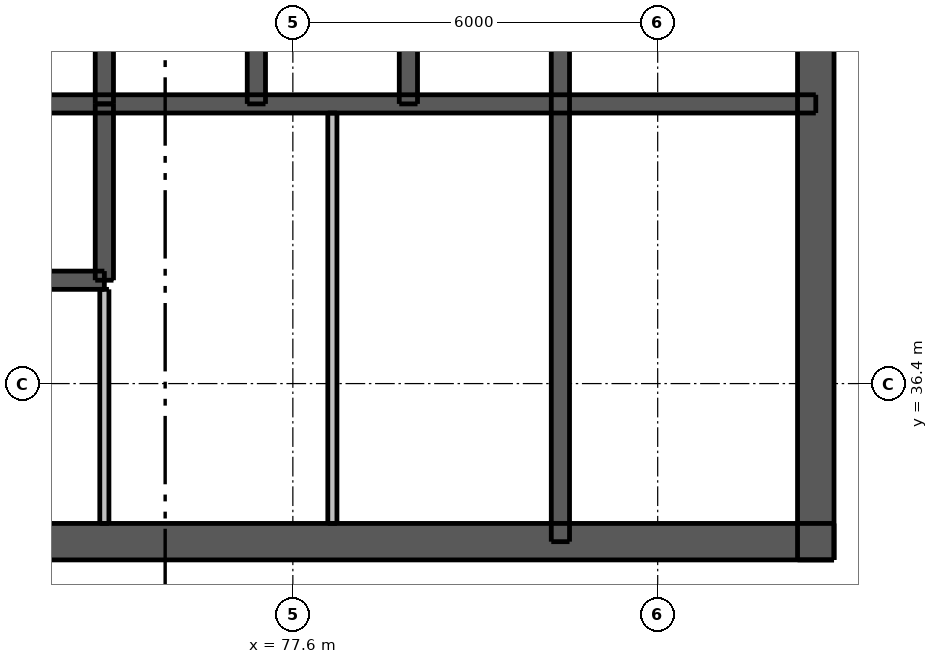
"""IFC4 building model, lengths in metres.
Left out: names, types, materials, properties, quantities, classifications, styles, units other than length and angle.
Written with IfcOpenShell. Run it as: python <this file> out.ifc"""

import sys

from ifc_helpers import new_model, si_unit, direction, frame, frame_2d, origin, place, context, subcontext, project, spatial, rectangle, extrude, element, fill, save


model = new_model("IFC4")
c1 = context("Model", 3, precision=1e-05, world=origin(), true_north=direction((0.0, 1.0)))
c2 = subcontext(c1, "Body", "Model", "MODEL_VIEW")
j1 = project(units=[si_unit("LENGTHUNIT", "METRE"), si_unit("PLANEANGLEUNIT", "RADIAN")], contexts=[c1])
p1 = place(None, origin())
s1 = spatial("IfcSite", under=j1, at=p1, CompositionType="ELEMENT")
p2 = place(p1, origin())
s2 = spatial("IfcBuilding", under=s1, at=p2, CompositionType="ELEMENT")
p3 = place(p2, frame((0.0, 0.0, 193.6)))
s3 = spatial("IfcBuildingStorey", under=s2, at=p3, CompositionType="ELEMENT", Elevation=193.6)
p4 = place(p3, frame((62.5, 33.8, 0.0), z_axis=(0.0, 0.0, 1.0), x_axis=(1.0, 0.0, 0.0)))
e1 = element("IfcWall", 1, at=p4, inside=s3, PredefinedType="SHEAR", context=c2, shape_type="SweptSolid", body=[
    extrude(rectangle(XDim=24.0, YDim=0.6, at=frame_2d((12.0, 0.0))), origin(), (0.0, 0.0, 1.0), 3.05),
])
p5 = place(p4, frame((1.925, 0.0, 0.0)))
e2 = element("IfcOpeningElement", 2, at=p5, cuts=e1, PredefinedType="OPENING", context=c2, shape_type="SweptSolid", body=[
    extrude(rectangle(XDim=1.1, YDim=2.1, at=frame_2d((0.55, 1.05))), frame((0.0, 0.31, 0.0), z_axis=(0.0, -1.0, 0.0), x_axis=(1.0, 0.0, 0.0)), (0.0, 0.0, 1.0), 0.62),
])
p6 = place(p4, frame((20.975, 0.0, 0.0)))
e3 = element("IfcOpeningElement", 3, at=p6, cuts=e1, PredefinedType="OPENING", context=c2, shape_type="SweptSolid", body=[
    extrude(rectangle(XDim=1.1, YDim=2.1, at=frame_2d((0.55, 1.05))), frame((0.0, 0.31, 0.0), z_axis=(0.0, -1.0, 0.0), x_axis=(1.0, 0.0, 0.0)), (0.0, 0.0, 1.0), 0.62),
])
p7 = place(p4, frame((8.0, 0.0, 0.0)))
e4 = element("IfcOpeningElement", 4, at=p7, cuts=e1, PredefinedType="OPENING", context=c2, shape_type="SweptSolid", body=[
    extrude(rectangle(XDim=1.1, YDim=2.1, at=frame_2d((0.55, 1.05))), frame((0.0, 0.31, 0.0), z_axis=(0.0, -1.0, 0.0), x_axis=(1.0, 0.0, 0.0)), (0.0, 0.0, 1.0), 0.62),
])
p8 = place(p4, frame((13.5, 0.0, 0.0)))
e5 = element("IfcOpeningElement", 5, at=p8, cuts=e1, PredefinedType="OPENING", context=c2, shape_type="SweptSolid", body=[
    extrude(rectangle(XDim=0.9, YDim=2.1, at=frame_2d((0.45, 1.05))), frame((0.0, 0.31, 0.0), z_axis=(0.0, -1.0, 0.0), x_axis=(1.0, 0.0, 0.0)), (0.0, 0.0, 1.0), 0.62),
])
p9 = place(p4, frame((17.1, 0.0, 0.0)))
e6 = element("IfcOpeningElement", 6, at=p9, cuts=e1, PredefinedType="OPENING", context=c2, shape_type="SweptSolid", body=[
    extrude(rectangle(XDim=0.9, YDim=2.1, at=frame_2d((0.45, 1.05))), frame((0.0, 0.31, 0.0), z_axis=(0.0, -1.0, 0.0), x_axis=(1.0, 0.0, 0.0)), (0.0, 0.0, 1.0), 0.62),
])
p10 = place(p3, frame((86.2, 33.5, 0.0), z_axis=(0.0, 0.0, 1.0), x_axis=(0.0, 1.0, 0.0)))
e7 = element("IfcWall", 7, at=p10, inside=s3, PredefinedType="SHEAR", context=c2, shape_type="SweptSolid", body=[
    extrude(rectangle(XDim=24.0, YDim=0.6, at=frame_2d((12.0, 0.0))), origin(), (0.0, 0.0, 1.0), 3.05),
])
p11 = place(p10, frame((11.2, 0.0, 0.0)))
e8 = element("IfcOpeningElement", 8, at=p11, cuts=e7, PredefinedType="OPENING", context=c2, shape_type="SweptSolid", body=[
    extrude(rectangle(XDim=1.6, YDim=2.1, at=frame_2d((0.8, 1.05))), frame((0.0, 0.31, 0.0), z_axis=(0.0, -1.0, 0.0), x_axis=(1.0, 0.0, 0.0)), (0.0, 0.0, 1.0), 0.62),
])
p12 = place(p3, frame((62.8, 41.0, 0.0), z_axis=(0.0, 0.0, 1.0), x_axis=(1.0, 0.0, 0.0)))
e9 = element("IfcWall", 9, at=p12, inside=s3, PredefinedType="SHEAR", context=c2, shape_type="SweptSolid", body=[
    extrude(rectangle(XDim=23.4, YDim=0.3, at=frame_2d((11.7, 0.0))), origin(), (0.0, 0.0, 1.0), 3.05),
])
p13 = place(p3, frame((82.0, 33.8, 0.0), z_axis=(0.0, 0.0, 1.0), x_axis=(0.0, 1.0, 0.0)))
e10 = element("IfcWall", 10, at=p13, inside=s3, PredefinedType="SHEAR", context=c2, shape_type="SweptSolid", body=[
    extrude(rectangle(XDim=10.1, YDim=0.3, at=frame_2d((5.05, 0.0))), origin(), (0.0, 0.0, 1.0), 3.05),
])
for number, where, z_axis, x_axis in (
    (11, (74.5, 41.0, 0.0), (0.0, 0.0, 1.0), (0.0, 1.0, 0.0)),
    (12, (77.0, 41.0, 0.0), (0.0, 0.0, 1.0), (0.0, 1.0, 0.0)),
    (13, (79.5, 41.0, 0.0), (0.0, 0.0, 1.0), (0.0, 1.0, 0.0)),
):
    element("IfcWall", number, at=place(p3, frame(where, z_axis=z_axis, x_axis=x_axis)), inside=s3, PredefinedType="SHEAR", context=c2, shape_type="SweptSolid", body=[
        extrude(rectangle(XDim=2.9, YDim=0.3, at=frame_2d((1.45, 0.0))), origin(), (0.0, 0.0, 1.0), 3.05),
    ])
p14 = place(p3, frame((67.0, 38.1, 0.0), z_axis=(0.0, 0.0, 1.0), x_axis=(1.0, 0.0, 0.0)))
e14 = element("IfcWall", 14, at=p14, inside=s3, PredefinedType="SHEAR", context=c2, shape_type="SweptSolid", body=[
    extrude(rectangle(XDim=7.5, YDim=0.3, at=frame_2d((3.75, 0.0))), origin(), (0.0, 0.0, 1.0), 3.05),
])
p15 = place(p14, frame((0.7, 0.0, 0.0)))
e15 = element("IfcOpeningElement", 15, at=p15, cuts=e14, PredefinedType="OPENING", context=c2, shape_type="SweptSolid", body=[
    extrude(rectangle(XDim=1.1, YDim=2.1, at=frame_2d((0.55, 1.05))), frame((0.0, 0.16, 0.0), z_axis=(0.0, -1.0, 0.0), x_axis=(1.0, 0.0, 0.0)), (0.0, 0.0, 1.0), 0.32),
])
p16 = place(p14, frame((3.2, 0.0, 0.0)))
e16 = element("IfcOpeningElement", 16, at=p16, cuts=e14, PredefinedType="OPENING", context=c2, shape_type="SweptSolid", body=[
    extrude(rectangle(XDim=1.1, YDim=2.1, at=frame_2d((0.55, 1.05))), frame((0.0, 0.16, 0.0), z_axis=(0.0, -1.0, 0.0), x_axis=(1.0, 0.0, 0.0)), (0.0, 0.0, 1.0), 0.32),
])
p17 = place(p14, frame((5.65, 0.0, 0.0)))
e17 = element("IfcOpeningElement", 17, at=p17, cuts=e14, PredefinedType="OPENING", context=c2, shape_type="SweptSolid", body=[
    extrude(rectangle(XDim=1.2, YDim=2.1, at=frame_2d((0.6, 1.05))), frame((0.0, 0.16, 0.0), z_axis=(0.0, -1.0, 0.0), x_axis=(1.0, 0.0, 0.0)), (0.0, 0.0, 1.0), 0.32),
])
p18 = place(p3, frame((74.5, 38.1, 0.0), z_axis=(0.0, 0.0, 1.0), x_axis=(0.0, 1.0, 0.0)))
e18 = element("IfcWall", 18, at=p18, inside=s3, PredefinedType="SHEAR", context=c2, shape_type="SweptSolid", body=[
    extrude(rectangle(XDim=2.9, YDim=0.3, at=frame_2d((1.45, 0.0))), origin(), (0.0, 0.0, 1.0), 3.05),
])
p19 = place(p3, frame((74.5, 34.1, 0.0), z_axis=(0.0, 0.0, 1.0), x_axis=(0.0, 1.0, 0.0)))
e19 = element("IfcWall", 19, at=p19, inside=s3, PredefinedType="PLUMBINGWALL", context=c2, shape_type="SweptSolid", body=[
    extrude(rectangle(XDim=3.85, YDim=0.15, at=frame_2d((1.925, 0.0))), origin(), (0.0, 0.0, 1.0), 3.05),
])
p20 = place(p3, frame((78.25, 34.1, 0.0), z_axis=(0.0, 0.0, 1.0), x_axis=(0.0, 1.0, 0.0)))
e20 = element("IfcWall", 20, at=p20, inside=s3, PredefinedType="PLUMBINGWALL", context=c2, shape_type="SweptSolid", body=[
    extrude(rectangle(XDim=6.75, YDim=0.15, at=frame_2d((3.375, 0.0))), origin(), (0.0, 0.0, 1.0), 3.05),
])
p21 = place(p6, origin())
e21 = element("IfcDoor", 21, at=p21, inside=s3, OperationType="SINGLE_SWING_RIGHT", PredefinedType="DOOR", context=c2, shape_type="SweptSolid", body=[
    extrude(rectangle(XDim=1.1, YDim=2.1, at=frame_2d((0.55, 1.05))), frame((0.0, 0.288, 0.0), z_axis=(0.0, -1.0, 0.0), x_axis=(1.0, 0.0, 0.0)), (0.0, 0.0, 1.0), 0.05),
])
fill(e3, e21)
p22 = place(p8, origin())
e22 = element("IfcDoor", 22, at=p22, inside=s3, OperationType="SINGLE_SWING_LEFT", PredefinedType="DOOR", context=c2, shape_type="SweptSolid", body=[
    extrude(rectangle(XDim=0.9, YDim=2.1, at=frame_2d((0.45, 1.05))), frame((0.0, 0.288, 0.0), z_axis=(0.0, -1.0, 0.0), x_axis=(1.0, 0.0, 0.0)), (0.0, 0.0, 1.0), 0.05),
])
fill(e5, e22)
p23 = place(p9, origin())
e23 = element("IfcDoor", 23, at=p23, inside=s3, OperationType="SINGLE_SWING_LEFT", PredefinedType="DOOR", context=c2, shape_type="SweptSolid", body=[
    extrude(rectangle(XDim=0.9, YDim=2.1, at=frame_2d((0.45, 1.05))), frame((0.0, 0.288, 0.0), z_axis=(0.0, -1.0, 0.0), x_axis=(1.0, 0.0, 0.0)), (0.0, 0.0, 1.0), 0.05),
])
fill(e6, e23)
p24 = place(p17, origin())
e24 = element("IfcDoor", 24, at=p24, inside=s3, OperationType="DOUBLE_DOOR_SLIDING", PredefinedType="DOOR", context=c2, shape_type="SweptSolid", body=[
    extrude(rectangle(XDim=1.2, YDim=2.1, at=frame_2d((0.6, 1.05))), frame((0.0, 0.025, 0.0), z_axis=(0.0, -1.0, 0.0), x_axis=(1.0, 0.0, 0.0)), (0.0, 0.0, 1.0), 0.05),
])
fill(e17, e24)
save(model, sys.argv[1])
